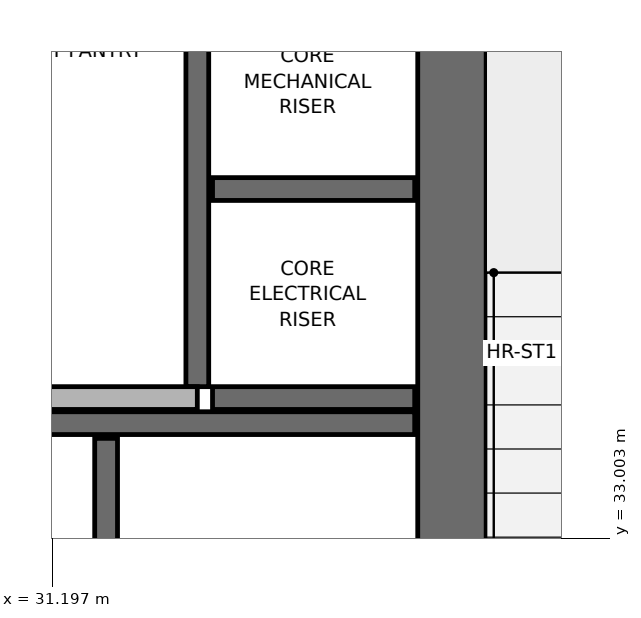
"""IFC4 building model, lengths in metres.
Left out: names, types, materials, properties, quantities, classifications, styles, units other than length and angle.
Written with IfcOpenShell. Run it as: python <this file> out.ifc"""

import sys

from ifc_helpers import new_model, si_unit, direction, frame, frame_2d, origin, place, context, subcontext, project, spatial, rectangle, extrude, element, save


model = new_model("IFC4")
c1 = context("Model", 3, precision=1e-05, world=origin(), true_north=direction((0.0, 1.0)))
c2 = subcontext(c1, "Body", "Model", "MODEL_VIEW")
j1 = project(units=[si_unit("LENGTHUNIT", "METRE"), si_unit("PLANEANGLEUNIT", "RADIAN")], contexts=[c1])
p1 = place(None, origin())
s1 = spatial("IfcSite", under=j1, at=p1, CompositionType="ELEMENT")
p2 = place(p1, origin())
s2 = spatial("IfcBuilding", under=s1, at=p2, CompositionType="ELEMENT")
p3 = place(p2, frame((0.0, 0.0, 108.0)))
s3 = spatial("IfcBuildingStorey", under=s2, at=p3, CompositionType="ELEMENT", Elevation=108.0)
p4 = place(p3, frame((33.825, 20.7, 0.0), z_axis=(0.0, 0.0, 1.0), x_axis=(0.0, 1.0, 0.0)))
e1 = element("IfcWall", 1, at=p4, inside=s3, PredefinedType="SHEAR", context=c2, shape_type="SweptSolid", body=[
    extrude(rectangle(XDim=16.2, YDim=0.45, at=frame_2d((8.1, 0.0))), origin(), (0.0, 0.0, 1.0), 5.4),
])
p5 = place(p3, frame((32.15, 34.0, 0.0), z_axis=(0.0, 0.0, 1.0), x_axis=(0.0, 1.0, 0.0)))
e2 = element("IfcWall", 2, at=p5, inside=s3, PredefinedType="SHEAR", context=c2, shape_type="SweptSolid", body=[
    extrude(rectangle(XDim=2.9, YDim=0.15, at=frame_2d((1.45, 0.0))), origin(), (0.0, 0.0, 1.0), 5.15),
])
for number, where, z_axis, x_axis in (
    (3, (32.25, 33.925, 0.0), (0.0, 0.0, 1.0), (1.0, 0.0, 0.0)),
    (4, (32.25, 35.3, 0.0), (0.0, 0.0, 1.0), (1.0, 0.0, 0.0)),
):
    element("IfcWall", number, at=place(p3, frame(where, z_axis=z_axis, x_axis=x_axis)), inside=s3, PredefinedType="SHEAR", context=c2, shape_type="SweptSolid", body=[
        extrude(rectangle(XDim=1.33, YDim=0.15, at=frame_2d((0.665, 0.0))), origin(), (0.0, 0.0, 1.0), 5.15),
    ])
p6 = place(p3, frame((29.5, 33.76, 0.0), z_axis=(0.0, 0.0, 1.0), x_axis=(1.0, 0.0, 0.0)))
e5 = element("IfcWall", 5, at=p6, inside=s3, PredefinedType="SHEAR", context=c2, shape_type="SweptSolid", body=[
    extrude(rectangle(XDim=4.08, YDim=0.15, at=frame_2d((2.04, 0.0))), origin(), (0.0, 0.0, 1.0), 5.15),
])
p7 = place(p3, frame((31.55, 31.42, 0.0), z_axis=(0.0, 0.0, 1.0), x_axis=(0.0, 1.0, 0.0)))
e6 = element("IfcWall", 6, at=p7, inside=s3, PredefinedType="SHEAR", context=c2, shape_type="SweptSolid", body=[
    extrude(rectangle(XDim=2.24, YDim=0.15, at=frame_2d((1.12, 0.0))), origin(), (0.0, 0.0, 1.0), 5.15),
])
p8 = place(p3, frame((29.525, 33.925, 0.0), z_axis=(0.0, 0.0, 1.0), x_axis=(1.0, 0.0, 0.0)))
e7 = element("IfcWall", 7, at=p8, inside=s3, PredefinedType="PARTITIONING", context=c2, shape_type="SweptSolid", body=[
    extrude(rectangle(XDim=2.625, YDim=0.15, at=frame_2d((1.312, 0.0))), origin(), (0.0, 0.0, 1.0), 5.15),
])
save(model, sys.argv[1])
